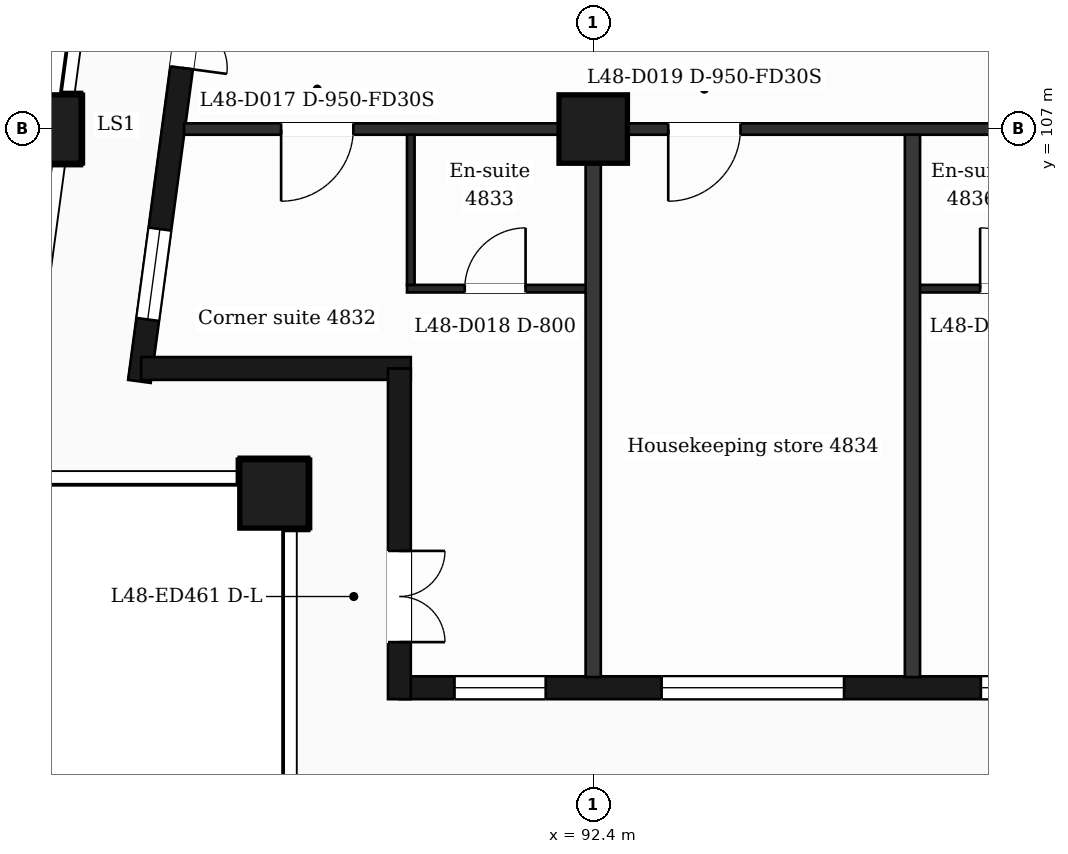
"""IFC4 building model, lengths in metres.
Left out: names, types, materials, properties, quantities, classifications, styles, units other than length and angle.
Written with IfcOpenShell. Run it as: python <this file> out.ifc"""

import sys

from ifc_helpers import new_model, si_unit, direction, frame, frame_2d, origin, origin_2d, place, context, subcontext, project, spatial, rectangle, extrude, element, fill, save


model = new_model("IFC4")
c1 = context("Model", 3, precision=1e-05, world=origin(), true_north=direction((0.0, 1.0)))
c2 = subcontext(c1, "Body", "Model", "MODEL_VIEW")
j1 = project(units=[si_unit("LENGTHUNIT", "METRE"), si_unit("PLANEANGLEUNIT", "RADIAN")], contexts=[c1])
p1 = place(None, origin())
s1 = spatial("IfcSite", under=j1, at=p1, CompositionType="ELEMENT")
p2 = place(p1, origin())
s2 = spatial("IfcBuilding", under=s1, at=p2, CompositionType="ELEMENT")
p3 = place(p2, frame((0.0, 0.0, 202.2)))
s3 = spatial("IfcBuildingStorey", under=s2, at=p3, CompositionType="ELEMENT", Elevation=202.2)
for number, where, z_axis, x_axis in (
    (1, (88.2, 102.2, 0.0), (0.0, 0.0, 1.0), (1.0, 0.0, 0.0)),
    (2, (92.4, 107.0, 0.0), (0.0, 0.0, 1.0), (1.0, 0.0, 0.0)),
    (3, (85.211, 107.0, 0.0), (0.0, 0.0, 1.0), (1.0, 0.0, 0.0)),
):
    element("IfcColumn", number, at=place(p3, frame(where, z_axis=z_axis, x_axis=x_axis)), inside=s3, PredefinedType="COLUMN", context=c2, shape_type="SweptSolid", body=[
        extrude(rectangle(XDim=0.9, YDim=0.9, at=origin_2d()), origin(), (0.0, 0.0, 1.0), 3.7),
    ])
p4 = place(p3, frame((89.85, 99.65, 0.0), z_axis=(0.0, 0.0, 1.0), x_axis=(1.0, 0.0, 0.0)))
e4 = element("IfcWall", 4, at=p4, inside=s3, PredefinedType="SOLIDWALL", context=c2, shape_type="SweptSolid", body=[
    extrude(rectangle(XDim=47.25, YDim=0.3, at=frame_2d((23.625, 0.0))), origin(), (0.0, 0.0, 1.0), 3.38),
])
p5 = place(p4, frame((0.725, 0.0, 0.9)))
e5 = element("IfcOpeningElement", 5, at=p5, cuts=e4, PredefinedType="OPENING", context=c2, shape_type="SweptSolid", body=[
    extrude(rectangle(XDim=1.2, YDim=2.1, at=frame_2d((0.6, 1.05))), frame((0.0, 0.16, 0.0), z_axis=(0.0, -1.0, 0.0), x_axis=(1.0, 0.0, 0.0)), (0.0, 0.0, 1.0), 0.32),
])
p6 = place(p4, frame((3.45, 0.0, 0.9)))
e6 = element("IfcOpeningElement", 6, at=p6, cuts=e4, PredefinedType="OPENING", context=c2, shape_type="SweptSolid", body=[
    extrude(rectangle(XDim=2.4, YDim=2.1, at=frame_2d((1.2, 1.05))), frame((0.0, 0.16, 0.0), z_axis=(0.0, -1.0, 0.0), x_axis=(1.0, 0.0, 0.0)), (0.0, 0.0, 1.0), 0.32),
])
p7 = place(p4, frame((7.65, 0.0, 0.9)))
e7 = element("IfcOpeningElement", 7, at=p7, cuts=e4, PredefinedType="OPENING", context=c2, shape_type="SweptSolid", body=[
    extrude(rectangle(XDim=2.4, YDim=2.1, at=frame_2d((1.2, 1.05))), frame((0.0, 0.16, 0.0), z_axis=(0.0, -1.0, 0.0), x_axis=(1.0, 0.0, 0.0)), (0.0, 0.0, 1.0), 0.32),
])
p8 = place(p4, frame((12.45, 0.0, 0.9)))
e8 = element("IfcOpeningElement", 8, at=p8, cuts=e4, PredefinedType="OPENING", context=c2, shape_type="SweptSolid", body=[
    extrude(rectangle(XDim=1.2, YDim=2.1, at=frame_2d((0.6, 1.05))), frame((0.0, 0.16, 0.0), z_axis=(0.0, -1.0, 0.0), x_axis=(1.0, 0.0, 0.0)), (0.0, 0.0, 1.0), 0.32),
])
p9 = place(p4, frame((16.65, 0.0, 0.9)))
e9 = element("IfcOpeningElement", 9, at=p9, cuts=e4, PredefinedType="OPENING", context=c2, shape_type="SweptSolid", body=[
    extrude(rectangle(XDim=1.2, YDim=2.1, at=frame_2d((0.6, 1.05))), frame((0.0, 0.16, 0.0), z_axis=(0.0, -1.0, 0.0), x_axis=(1.0, 0.0, 0.0)), (0.0, 0.0, 1.0), 0.32),
])
p10 = place(p4, frame((19.95, 0.0, 0.0)))
e10 = element("IfcOpeningElement", 10, at=p10, cuts=e4, PredefinedType="OPENING", context=c2, shape_type="SweptSolid", body=[
    extrude(rectangle(XDim=1.2, YDim=2.4, at=frame_2d((0.6, 1.2))), frame((0.0, 0.16, 0.0), z_axis=(0.0, -1.0, 0.0), x_axis=(1.0, 0.0, 0.0)), (0.0, 0.0, 1.0), 0.32),
])
p11 = place(p4, frame((21.75, 0.0, 0.9)))
e11 = element("IfcOpeningElement", 11, at=p11, cuts=e4, PredefinedType="OPENING", context=c2, shape_type="SweptSolid", body=[
    extrude(rectangle(XDim=1.2, YDim=2.1, at=frame_2d((0.6, 1.05))), frame((0.0, 0.16, 0.0), z_axis=(0.0, -1.0, 0.0), x_axis=(1.0, 0.0, 0.0)), (0.0, 0.0, 1.0), 0.32),
])
p12 = place(p4, frame((24.45, 0.0, 0.9)))
e12 = element("IfcOpeningElement", 12, at=p12, cuts=e4, PredefinedType="OPENING", context=c2, shape_type="SweptSolid", body=[
    extrude(rectangle(XDim=2.4, YDim=2.1, at=frame_2d((1.2, 1.05))), frame((0.0, 0.16, 0.0), z_axis=(0.0, -1.0, 0.0), x_axis=(1.0, 0.0, 0.0)), (0.0, 0.0, 1.0), 0.32),
])
p13 = place(p4, frame((28.35, 0.0, 0.0)))
e13 = element("IfcOpeningElement", 13, at=p13, cuts=e4, PredefinedType="OPENING", context=c2, shape_type="SweptSolid", body=[
    extrude(rectangle(XDim=1.2, YDim=2.4, at=frame_2d((0.6, 1.2))), frame((0.0, 0.16, 0.0), z_axis=(0.0, -1.0, 0.0), x_axis=(1.0, 0.0, 0.0)), (0.0, 0.0, 1.0), 0.32),
])
p14 = place(p4, frame((30.15, 0.0, 0.9)))
e14 = element("IfcOpeningElement", 14, at=p14, cuts=e4, PredefinedType="OPENING", context=c2, shape_type="SweptSolid", body=[
    extrude(rectangle(XDim=1.2, YDim=2.1, at=frame_2d((0.6, 1.05))), frame((0.0, 0.16, 0.0), z_axis=(0.0, -1.0, 0.0), x_axis=(1.0, 0.0, 0.0)), (0.0, 0.0, 1.0), 0.32),
])
p15 = place(p4, frame((32.85, 0.0, 0.9)))
e15 = element("IfcOpeningElement", 15, at=p15, cuts=e4, PredefinedType="OPENING", context=c2, shape_type="SweptSolid", body=[
    extrude(rectangle(XDim=2.4, YDim=2.1, at=frame_2d((1.2, 1.05))), frame((0.0, 0.16, 0.0), z_axis=(0.0, -1.0, 0.0), x_axis=(1.0, 0.0, 0.0)), (0.0, 0.0, 1.0), 0.32),
])
p16 = place(p4, frame((37.05, 0.0, 0.9)))
e16 = element("IfcOpeningElement", 16, at=p16, cuts=e4, PredefinedType="OPENING", context=c2, shape_type="SweptSolid", body=[
    extrude(rectangle(XDim=2.4, YDim=2.1, at=frame_2d((1.2, 1.05))), frame((0.0, 0.16, 0.0), z_axis=(0.0, -1.0, 0.0), x_axis=(1.0, 0.0, 0.0)), (0.0, 0.0, 1.0), 0.32),
])
p17 = place(p4, frame((41.85, 0.0, 0.9)))
e17 = element("IfcOpeningElement", 17, at=p17, cuts=e4, PredefinedType="OPENING", context=c2, shape_type="SweptSolid", body=[
    extrude(rectangle(XDim=1.2, YDim=2.1, at=frame_2d((0.6, 1.05))), frame((0.0, 0.16, 0.0), z_axis=(0.0, -1.0, 0.0), x_axis=(1.0, 0.0, 0.0)), (0.0, 0.0, 1.0), 0.32),
])
p18 = place(p4, frame((45.25, 0.0, 0.9)))
e18 = element("IfcOpeningElement", 18, at=p18, cuts=e4, PredefinedType="OPENING", context=c2, shape_type="SweptSolid", body=[
    extrude(rectangle(XDim=1.2, YDim=2.1, at=frame_2d((0.6, 1.05))), frame((0.0, 0.16, 0.0), z_axis=(0.0, -1.0, 0.0), x_axis=(1.0, 0.0, 0.0)), (0.0, 0.0, 1.0), 0.32),
])
p19 = place(p3, frame((87.334, 110.4, 0.0), z_axis=(0.0, 0.0, 1.0), x_axis=(-0.133437175554, -0.991057273915, 0.0)))
e19 = element("IfcWall", 19, at=p19, inside=s3, PredefinedType="SOLIDWALL", context=c2, shape_type="SweptSolid", body=[
    extrude(rectangle(XDim=6.781, YDim=0.3, at=frame_2d((3.39, 0.0))), origin(), (0.0, 0.0, 1.0), 3.38),
])
p20 = place(p19, frame((1.418, 0.0, 0.0)))
e20 = element("IfcOpeningElement", 20, at=p20, cuts=e19, PredefinedType="OPENING", context=c2, shape_type="SweptSolid", body=[
    extrude(rectangle(XDim=1.2, YDim=2.4, at=frame_2d((0.6, 1.2))), frame((0.0, 0.16, 0.0), z_axis=(0.0, -1.0, 0.0), x_axis=(1.0, 0.0, 0.0)), (0.0, 0.0, 1.0), 0.32),
])
p21 = place(p19, frame((4.758, 0.0, 0.9)))
e21 = element("IfcOpeningElement", 21, at=p21, cuts=e19, PredefinedType="OPENING", context=c2, shape_type="SweptSolid", body=[
    extrude(rectangle(XDim=1.2, YDim=2.1, at=frame_2d((0.6, 1.05))), frame((0.0, 0.16, 0.0), z_axis=(0.0, -1.0, 0.0), x_axis=(1.0, 0.0, 0.0)), (0.0, 0.0, 1.0), 0.32),
])
p22 = place(p3, frame((86.452, 103.85, 0.0), z_axis=(0.0, 0.0, 1.0), x_axis=(1.0, 0.0, 0.0)))
e22 = element("IfcWall", 22, at=p22, inside=s3, PredefinedType="SOLIDWALL", context=c2, shape_type="SweptSolid", body=[
    extrude(rectangle(XDim=3.548, YDim=0.3, at=frame_2d((1.774, 0.0))), origin(), (0.0, 0.0, 1.0), 3.38),
])
p23 = place(p3, frame((89.85, 103.85, 0.0), z_axis=(0.0, 0.0, 1.0), x_axis=(0.0, -1.0, 0.0)))
e23 = element("IfcWall", 23, at=p23, inside=s3, PredefinedType="SOLIDWALL", context=c2, shape_type="SweptSolid", body=[
    extrude(rectangle(XDim=4.35, YDim=0.3, at=frame_2d((2.175, 0.0))), origin(), (0.0, 0.0, 1.0), 3.38),
])
p24 = place(p23, frame((2.4, 0.0, 0.0)))
e24 = element("IfcOpeningElement", 24, at=p24, cuts=e23, PredefinedType="OPENING", context=c2, shape_type="SweptSolid", body=[
    extrude(rectangle(XDim=1.2, YDim=2.4, at=frame_2d((0.6, 1.2))), frame((0.0, 0.16, 0.0), z_axis=(0.0, -1.0, 0.0), x_axis=(1.0, 0.0, 0.0)), (0.0, 0.0, 1.0), 0.32),
])
p25 = place(p3, frame((89.95, 104.9, 0.0), z_axis=(0.0, 0.0, 1.0), x_axis=(1.0, 0.0, 0.0)))
e25 = element("IfcWall", 25, at=p25, inside=s3, PredefinedType="PARTITIONING", context=c2, shape_type="SweptSolid", body=[
    extrude(rectangle(XDim=2.45, YDim=0.1, at=frame_2d((1.225, 0.0))), origin(), (0.0, 0.0, 1.0), 3.38),
])
p26 = place(p25, frame((0.76, 0.0, 0.0)))
e26 = element("IfcOpeningElement", 26, at=p26, cuts=e25, PredefinedType="OPENING", context=c2, shape_type="SweptSolid", body=[
    extrude(rectangle(XDim=0.8, YDim=2.1, at=frame_2d((0.4, 1.05))), frame((0.0, 0.06, 0.0), z_axis=(0.0, -1.0, 0.0), x_axis=(1.0, 0.0, 0.0)), (0.0, 0.0, 1.0), 0.12),
])
p27 = place(p3, frame((96.6, 104.9, 0.0), z_axis=(0.0, 0.0, 1.0), x_axis=(1.0, 0.0, 0.0)))
e27 = element("IfcWall", 27, at=p27, inside=s3, PredefinedType="PARTITIONING", context=c2, shape_type="SweptSolid", body=[
    extrude(rectangle(XDim=2.45, YDim=0.1, at=frame_2d((1.225, 0.0))), origin(), (0.0, 0.0, 1.0), 3.38),
])
p28 = place(p27, frame((0.89, 0.0, 0.0)))
e28 = element("IfcOpeningElement", 28, at=p28, cuts=e27, PredefinedType="OPENING", context=c2, shape_type="SweptSolid", body=[
    extrude(rectangle(XDim=0.8, YDim=2.1, at=frame_2d((0.4, 1.05))), frame((0.0, 0.06, 0.0), z_axis=(0.0, -1.0, 0.0), x_axis=(1.0, 0.0, 0.0)), (0.0, 0.0, 1.0), 0.12),
])
p29 = place(p3, frame((87.018, 107.0, 0.0), z_axis=(0.0, 0.0, 1.0), x_axis=(1.0, 0.0, 0.0)))
e29 = element("IfcWall", 29, at=p29, inside=s3, PredefinedType="PARTITIONING", context=c2, shape_type="SweptSolid", body=[
    extrude(rectangle(XDim=52.765, YDim=0.15, at=frame_2d((26.382, 0.0))), origin(), (0.0, 0.0, 1.0), 3.38),
])
p30 = place(p29, frame((1.276, 0.0, 0.0)))
e30 = element("IfcOpeningElement", 30, at=p30, cuts=e29, PredefinedType="OPENING", context=c2, shape_type="SweptSolid", body=[
    extrude(rectangle(XDim=0.95, YDim=2.1, at=frame_2d((0.475, 1.05))), frame((0.0, 0.085, 0.0), z_axis=(0.0, -1.0, 0.0), x_axis=(1.0, 0.0, 0.0)), (0.0, 0.0, 1.0), 0.17),
])
p31 = place(p29, frame((6.369, 0.0, 0.0)))
e31 = element("IfcOpeningElement", 31, at=p31, cuts=e29, PredefinedType="OPENING", context=c2, shape_type="SweptSolid", body=[
    extrude(rectangle(XDim=0.95, YDim=2.1, at=frame_2d((0.475, 1.05))), frame((0.0, 0.085, 0.0), z_axis=(0.0, -1.0, 0.0), x_axis=(1.0, 0.0, 0.0)), (0.0, 0.0, 1.0), 0.17),
])
p32 = place(p29, frame((12.112, 0.0, 0.0)))
e32 = element("IfcOpeningElement", 32, at=p32, cuts=e29, PredefinedType="OPENING", context=c2, shape_type="SweptSolid", body=[
    extrude(rectangle(XDim=0.95, YDim=2.1, at=frame_2d((0.475, 1.05))), frame((0.0, 0.085, 0.0), z_axis=(0.0, -1.0, 0.0), x_axis=(1.0, 0.0, 0.0)), (0.0, 0.0, 1.0), 0.17),
])
p33 = place(p29, frame((14.582, 0.0, 0.0)))
e33 = element("IfcOpeningElement", 33, at=p33, cuts=e29, PredefinedType="OPENING", context=c2, shape_type="SweptSolid", body=[
    extrude(rectangle(XDim=0.95, YDim=2.1, at=frame_2d((0.475, 1.05))), frame((0.0, 0.085, 0.0), z_axis=(0.0, -1.0, 0.0), x_axis=(1.0, 0.0, 0.0)), (0.0, 0.0, 1.0), 0.17),
])
p34 = place(p29, frame((20.512, 0.0, 0.0)))
e34 = element("IfcOpeningElement", 34, at=p34, cuts=e29, PredefinedType="OPENING", context=c2, shape_type="SweptSolid", body=[
    extrude(rectangle(XDim=0.95, YDim=2.1, at=frame_2d((0.475, 1.05))), frame((0.0, 0.085, 0.0), z_axis=(0.0, -1.0, 0.0), x_axis=(1.0, 0.0, 0.0)), (0.0, 0.0, 1.0), 0.17),
])
p35 = place(p29, frame((25.157, 0.0, 0.0)))
e35 = element("IfcOpeningElement", 35, at=p35, cuts=e29, PredefinedType="OPENING", context=c2, shape_type="SweptSolid", body=[
    extrude(rectangle(XDim=0.95, YDim=2.1, at=frame_2d((0.475, 1.05))), frame((0.0, 0.085, 0.0), z_axis=(0.0, -1.0, 0.0), x_axis=(1.0, 0.0, 0.0)), (0.0, 0.0, 1.0), 0.17),
])
p36 = place(p29, frame((26.657, 0.0, 0.0)))
e36 = element("IfcOpeningElement", 36, at=p36, cuts=e29, PredefinedType="OPENING", context=c2, shape_type="SweptSolid", body=[
    extrude(rectangle(XDim=0.95, YDim=2.1, at=frame_2d((0.475, 1.05))), frame((0.0, 0.085, 0.0), z_axis=(0.0, -1.0, 0.0), x_axis=(1.0, 0.0, 0.0)), (0.0, 0.0, 1.0), 0.17),
])
p37 = place(p29, frame((31.302, 0.0, 0.0)))
e37 = element("IfcOpeningElement", 37, at=p37, cuts=e29, PredefinedType="OPENING", context=c2, shape_type="SweptSolid", body=[
    extrude(rectangle(XDim=0.95, YDim=2.1, at=frame_2d((0.475, 1.05))), frame((0.0, 0.085, 0.0), z_axis=(0.0, -1.0, 0.0), x_axis=(1.0, 0.0, 0.0)), (0.0, 0.0, 1.0), 0.17),
])
p38 = place(p29, frame((41.207, 0.0, 0.0)))
e38 = element("IfcOpeningElement", 38, at=p38, cuts=e29, PredefinedType="OPENING", context=c2, shape_type="SweptSolid", body=[
    extrude(rectangle(XDim=1.0, YDim=2.1, at=frame_2d((0.5, 1.05))), frame((0.0, 0.085, 0.0), z_axis=(0.0, -1.0, 0.0), x_axis=(1.0, 0.0, 0.0)), (0.0, 0.0, 1.0), 0.17),
])
p39 = place(p29, frame((43.907, 0.0, 0.0)))
e39 = element("IfcOpeningElement", 39, at=p39, cuts=e29, PredefinedType="OPENING", context=c2, shape_type="SweptSolid", body=[
    extrude(rectangle(XDim=0.95, YDim=2.1, at=frame_2d((0.475, 1.05))), frame((0.0, 0.085, 0.0), z_axis=(0.0, -1.0, 0.0), x_axis=(1.0, 0.0, 0.0)), (0.0, 0.0, 1.0), 0.17),
])
p40 = place(p29, frame((49.285, 0.0, 0.0)))
e40 = element("IfcOpeningElement", 40, at=p40, cuts=e29, PredefinedType="OPENING", context=c2, shape_type="SweptSolid", body=[
    extrude(rectangle(XDim=0.95, YDim=2.1, at=frame_2d((0.475, 1.05))), frame((0.0, 0.085, 0.0), z_axis=(0.0, -1.0, 0.0), x_axis=(1.0, 0.0, 0.0)), (0.0, 0.0, 1.0), 0.17),
])
p41 = place(p3, frame((90.0, 104.95, 0.0), z_axis=(0.0, 0.0, 1.0), x_axis=(0.0, 1.0, 0.0)))
e41 = element("IfcWall", 41, at=p41, inside=s3, PredefinedType="PARTITIONING", context=c2, shape_type="SweptSolid", body=[
    extrude(rectangle(XDim=1.975, YDim=0.1, at=frame_2d((0.988, 0.0))), origin(), (0.0, 0.0, 1.0), 3.38),
])
for number, where, z_axis, x_axis in (
    (42, (92.4, 99.79, 0.0), (0.0, 0.0, 1.0), (0.0, 1.0, 0.0)),
    (43, (96.6, 99.79, 0.0), (0.0, 0.0, 1.0), (0.0, 1.0, 0.0)),
):
    element("IfcWall", number, at=place(p3, frame(where, z_axis=z_axis, x_axis=x_axis)), inside=s3, PredefinedType="PARTITIONING", context=c2, shape_type="SweptSolid", body=[
        extrude(rectangle(XDim=7.135, YDim=0.2, at=frame_2d((3.567, 0.0))), origin(), (0.0, 0.0, 1.0), 3.38),
    ])
p42 = place(p5, origin())
e44 = element("IfcWindow", 44, at=p42, inside=s3, PartitioningType="SINGLE_PANEL", PredefinedType="WINDOW", context=c2, shape_type="SweptSolid", body=[
    extrude(rectangle(XDim=1.2, YDim=2.1, at=frame_2d((0.6, 1.05))), frame((0.0, 0.03, 0.0), z_axis=(0.0, -1.0, 0.0), x_axis=(1.0, 0.0, 0.0)), (0.0, 0.0, 1.0), 0.06),
])
fill(e5, e44)
p43 = place(p6, origin())
e45 = element("IfcWindow", 45, at=p43, inside=s3, PartitioningType="SINGLE_PANEL", PredefinedType="WINDOW", context=c2, shape_type="SweptSolid", body=[
    extrude(rectangle(XDim=2.4, YDim=2.1, at=frame_2d((1.2, 1.05))), frame((0.0, 0.03, 0.0), z_axis=(0.0, -1.0, 0.0), x_axis=(1.0, 0.0, 0.0)), (0.0, 0.0, 1.0), 0.06),
])
fill(e6, e45)
p44 = place(p7, origin())
e46 = element("IfcWindow", 46, at=p44, inside=s3, PartitioningType="SINGLE_PANEL", PredefinedType="WINDOW", context=c2, shape_type="SweptSolid", body=[
    extrude(rectangle(XDim=2.4, YDim=2.1, at=frame_2d((1.2, 1.05))), frame((0.0, 0.03, 0.0), z_axis=(0.0, -1.0, 0.0), x_axis=(1.0, 0.0, 0.0)), (0.0, 0.0, 1.0), 0.06),
])
fill(e7, e46)
p45 = place(p20, origin())
e47 = element("IfcDoor", 47, at=p45, inside=s3, OperationType="DOUBLE_DOOR_SINGLE_SWING", PredefinedType="DOOR", context=c2, shape_type="SweptSolid", body=[
    extrude(rectangle(XDim=1.2, YDim=2.4, at=frame_2d((0.6, 1.2))), frame((0.0, 0.025, 0.0), z_axis=(0.0, -1.0, 0.0), x_axis=(1.0, 0.0, 0.0)), (0.0, 0.0, 1.0), 0.05),
])
fill(e20, e47)
p46 = place(p21, origin())
e48 = element("IfcWindow", 48, at=p46, inside=s3, PartitioningType="SINGLE_PANEL", PredefinedType="WINDOW", context=c2, shape_type="SweptSolid", body=[
    extrude(rectangle(XDim=1.2, YDim=2.1, at=frame_2d((0.6, 1.05))), frame((0.0, 0.03, 0.0), z_axis=(0.0, -1.0, 0.0), x_axis=(1.0, 0.0, 0.0)), (0.0, 0.0, 1.0), 0.06),
])
fill(e21, e48)
p47 = place(p24, origin())
e49 = element("IfcDoor", 49, at=p47, inside=s3, OperationType="DOUBLE_DOOR_SINGLE_SWING", PredefinedType="DOOR", context=c2, shape_type="SweptSolid", body=[
    extrude(rectangle(XDim=1.2, YDim=2.4, at=frame_2d((0.6, 1.2))), frame((0.0, 0.025, 0.0), z_axis=(0.0, -1.0, 0.0), x_axis=(1.0, 0.0, 0.0)), (0.0, 0.0, 1.0), 0.05),
])
fill(e24, e49)
p48 = place(p30, origin())
e50 = element("IfcDoor", 50, at=p48, inside=s3, OperationType="SINGLE_SWING_LEFT", PredefinedType="DOOR", context=c2, shape_type="SweptSolid", body=[
    extrude(rectangle(XDim=0.95, YDim=2.1, at=frame_2d((0.475, 1.05))), frame((0.0, 0.025, 0.0), z_axis=(0.0, -1.0, 0.0), x_axis=(1.0, 0.0, 0.0)), (0.0, 0.0, 1.0), 0.05),
])
fill(e30, e50)
p49 = place(p26, origin())
e51 = element("IfcDoor", 51, at=p49, inside=s3, OperationType="SINGLE_SWING_RIGHT", PredefinedType="DOOR", context=c2, shape_type="SweptSolid", body=[
    extrude(rectangle(XDim=0.8, YDim=2.1, at=frame_2d((0.4, 1.05))), frame((0.0, 0.025, 0.0), z_axis=(0.0, -1.0, 0.0), x_axis=(1.0, 0.0, 0.0)), (0.0, 0.0, 1.0), 0.05),
])
fill(e26, e51)
p50 = place(p31, origin())
e52 = element("IfcDoor", 52, at=p50, inside=s3, OperationType="SINGLE_SWING_LEFT", PredefinedType="DOOR", context=c2, shape_type="SweptSolid", body=[
    extrude(rectangle(XDim=0.95, YDim=2.1, at=frame_2d((0.475, 1.05))), frame((0.0, 0.025, 0.0), z_axis=(0.0, -1.0, 0.0), x_axis=(1.0, 0.0, 0.0)), (0.0, 0.0, 1.0), 0.05),
])
fill(e31, e52)
p51 = place(p28, origin())
e53 = element("IfcDoor", 53, at=p51, inside=s3, OperationType="SINGLE_SWING_LEFT", PredefinedType="DOOR", context=c2, shape_type="SweptSolid", body=[
    extrude(rectangle(XDim=0.8, YDim=2.1, at=frame_2d((0.4, 1.05))), frame((0.0, 0.025, 0.0), z_axis=(0.0, -1.0, 0.0), x_axis=(1.0, 0.0, 0.0)), (0.0, 0.0, 1.0), 0.05),
])
fill(e28, e53)
save(model, sys.argv[1])
